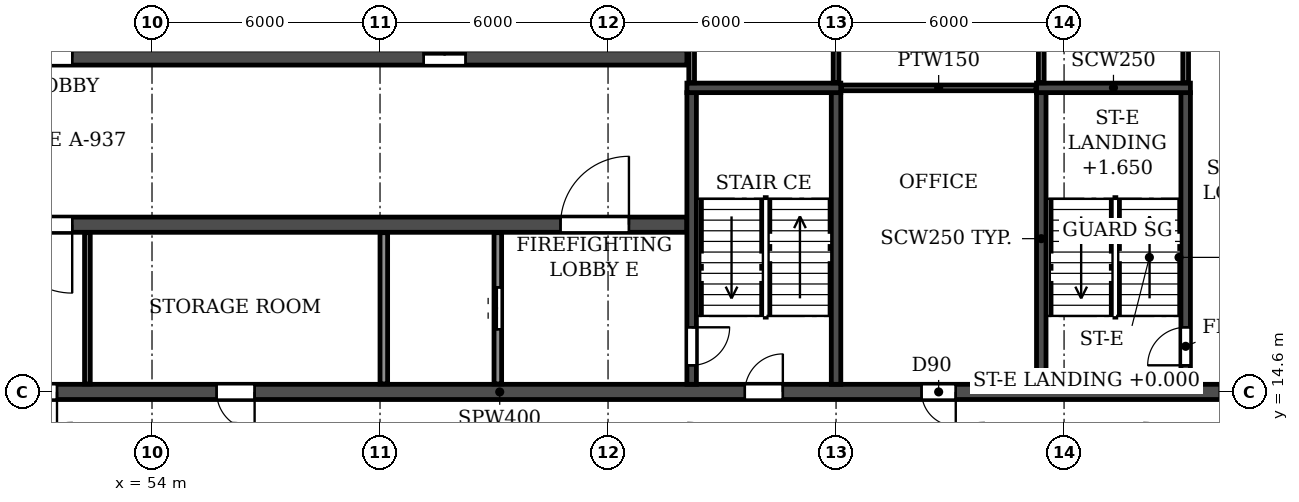
"""IFC4 building model, lengths in metres.
Left out: names, types, materials, properties, quantities, classifications, styles, units other than length and angle.
Written with IfcOpenShell. Run it as: python <this file> out.ifc"""

import sys

from ifc_helpers import new_model, si_unit, direction, frame, frame_2d, origin, place, context, subcontext, project, spatial, rectangle, extrude, element, fill, save


model = new_model("IFC4")
c1 = context("Model", 3, precision=1e-05, world=origin(), true_north=direction((0.0, 1.0)))
c2 = subcontext(c1, "Body", "Model", "MODEL_VIEW")
j1 = project(units=[si_unit("LENGTHUNIT", "METRE"), si_unit("PLANEANGLEUNIT", "RADIAN")], contexts=[c1])
p1 = place(None, origin())
s1 = spatial("IfcSite", under=j1, at=p1, CompositionType="ELEMENT")
p2 = place(p1, origin())
s2 = spatial("IfcBuilding", under=s1, at=p2, CompositionType="ELEMENT")
p3 = place(p2, frame((0.0, 0.0, 211.5)))
s3 = spatial("IfcBuildingStorey", under=s2, at=p3, CompositionType="ELEMENT", Elevation=211.5)
p4 = place(p3, frame((18.2, 14.6, 0.0), z_axis=(0.0, 0.0, 1.0), x_axis=(1.0, 0.0, 0.0)))
e1 = element("IfcWall", 1, at=p4, inside=s3, PredefinedType="SOLIDWALL", context=c2, shape_type="SweptSolid", body=[
    extrude(rectangle(XDim=65.6, YDim=0.4, at=frame_2d((32.8, 0.0))), origin(), (0.0, 0.0, 1.0), 2.95),
])
p5 = place(p4, frame((0.7, 0.0, 0.0)))
e2 = element("IfcOpeningElement", 2, at=p5, cuts=e1, PredefinedType="OPENING", context=c2, shape_type="SweptSolid", body=[
    extrude(rectangle(XDim=1.0, YDim=2.1, at=frame_2d((0.5, 1.05))), frame((0.0, 0.21, 0.0), z_axis=(0.0, -1.0, 0.0), x_axis=(1.0, 0.0, 0.0)), (0.0, 0.0, 1.0), 0.42),
])
p6 = place(p4, frame((8.65, 0.0, 0.0)))
e3 = element("IfcOpeningElement", 3, at=p6, cuts=e1, PredefinedType="OPENING", context=c2, shape_type="SweptSolid", body=[
    extrude(rectangle(XDim=0.9, YDim=2.1, at=frame_2d((0.45, 1.05))), frame((0.0, 0.21, 0.0), z_axis=(0.0, -1.0, 0.0), x_axis=(1.0, 0.0, 0.0)), (0.0, 0.0, 1.0), 0.42),
])
p7 = place(p4, frame((13.2, 0.0, 0.0)))
e4 = element("IfcOpeningElement", 4, at=p7, cuts=e1, PredefinedType="OPENING", context=c2, shape_type="SweptSolid", body=[
    extrude(rectangle(XDim=1.0, YDim=2.1, at=frame_2d((0.5, 1.05))), frame((0.0, 0.21, 0.0), z_axis=(0.0, -1.0, 0.0), x_axis=(1.0, 0.0, 0.0)), (0.0, 0.0, 1.0), 0.42),
])
p8 = place(p4, frame((24.5, 0.0, 0.0)))
e5 = element("IfcOpeningElement", 5, at=p8, cuts=e1, PredefinedType="OPENING", context=c2, shape_type="SweptSolid", body=[
    extrude(rectangle(XDim=1.0, YDim=2.1, at=frame_2d((0.5, 1.05))), frame((0.0, 0.21, 0.0), z_axis=(0.0, -1.0, 0.0), x_axis=(1.0, 0.0, 0.0)), (0.0, 0.0, 1.0), 0.42),
])
p9 = place(p4, frame((28.15, 0.0, 0.0)))
e6 = element("IfcOpeningElement", 6, at=p9, cuts=e1, PredefinedType="OPENING", context=c2, shape_type="SweptSolid", body=[
    extrude(rectangle(XDim=1.5, YDim=2.1, at=frame_2d((0.75, 1.05))), frame((0.0, 0.21, 0.0), z_axis=(0.0, -1.0, 0.0), x_axis=(1.0, 0.0, 0.0)), (0.0, 0.0, 1.0), 0.42),
])
p10 = place(p4, frame((32.3, 0.0, 0.0)))
e7 = element("IfcOpeningElement", 7, at=p10, cuts=e1, PredefinedType="OPENING", context=c2, shape_type="SweptSolid", body=[
    extrude(rectangle(XDim=1.0, YDim=2.1, at=frame_2d((0.5, 1.05))), frame((0.0, 0.21, 0.0), z_axis=(0.0, -1.0, 0.0), x_axis=(1.0, 0.0, 0.0)), (0.0, 0.0, 1.0), 0.42),
])
p11 = place(p4, frame((37.5, 0.0, 0.0)))
e8 = element("IfcOpeningElement", 8, at=p11, cuts=e1, PredefinedType="OPENING", context=c2, shape_type="SweptSolid", body=[
    extrude(rectangle(XDim=1.0, YDim=2.1, at=frame_2d((0.5, 1.05))), frame((0.0, 0.21, 0.0), z_axis=(0.0, -1.0, 0.0), x_axis=(1.0, 0.0, 0.0)), (0.0, 0.0, 1.0), 0.42),
])
p12 = place(p4, frame((51.4, 0.0, 0.0)))
e9 = element("IfcOpeningElement", 9, at=p12, cuts=e1, PredefinedType="OPENING", context=c2, shape_type="SweptSolid", body=[
    extrude(rectangle(XDim=1.0, YDim=2.1, at=frame_2d((0.5, 1.05))), frame((0.0, 0.21, 0.0), z_axis=(0.0, -1.0, 0.0), x_axis=(1.0, 0.0, 0.0)), (0.0, 0.0, 1.0), 0.42),
])
p13 = place(p4, frame((56.05, 0.0, 0.0)))
e10 = element("IfcOpeningElement", 10, at=p13, cuts=e1, PredefinedType="OPENING", context=c2, shape_type="SweptSolid", body=[
    extrude(rectangle(XDim=0.9, YDim=2.1, at=frame_2d((0.45, 1.05))), frame((0.0, 0.21, 0.0), z_axis=(0.0, -1.0, 0.0), x_axis=(1.0, 0.0, 0.0)), (0.0, 0.0, 1.0), 0.42),
])
p14 = place(p4, frame((63.9, 0.0, 0.0)))
e11 = element("IfcOpeningElement", 11, at=p14, cuts=e1, PredefinedType="OPENING", context=c2, shape_type="SweptSolid", body=[
    extrude(rectangle(XDim=1.0, YDim=2.1, at=frame_2d((0.5, 1.05))), frame((0.0, 0.21, 0.0), z_axis=(0.0, -1.0, 0.0), x_axis=(1.0, 0.0, 0.0)), (0.0, 0.0, 1.0), 0.42),
])
p15 = place(p3, frame((33.925, 19.0, 0.0), z_axis=(0.0, 0.0, 1.0), x_axis=(1.0, 0.0, 0.0)))
e12 = element("IfcWall", 12, at=p15, inside=s3, PredefinedType="SOLIDWALL", context=c2, shape_type="SweptSolid", body=[
    extrude(rectangle(XDim=34.15, YDim=0.4, at=frame_2d((17.075, 0.0))), origin(), (0.0, 0.0, 1.0), 2.95),
])
p16 = place(p15, frame((16.175, 0.0, 0.0)))
e13 = element("IfcOpeningElement", 13, at=p16, cuts=e12, PredefinedType="OPENING", context=c2, shape_type="SweptSolid", body=[
    extrude(rectangle(XDim=1.8, YDim=2.1, at=frame_2d((0.9, 1.05))), frame((0.0, 0.21, 0.0), z_axis=(0.0, -1.0, 0.0), x_axis=(1.0, 0.0, 0.0)), (0.0, 0.0, 1.0), 0.42),
])
p17 = place(p15, frame((1.525, 0.0, 0.0)))
e14 = element("IfcOpeningElement", 14, at=p17, cuts=e12, PredefinedType="OPENING", context=c2, shape_type="SweptSolid", body=[
    extrude(rectangle(XDim=1.8, YDim=2.1, at=frame_2d((0.9, 1.05))), frame((0.0, 0.21, 0.0), z_axis=(0.0, -1.0, 0.0), x_axis=(1.0, 0.0, 0.0)), (0.0, 0.0, 1.0), 0.42),
])
p18 = place(p15, frame((30.825, 0.0, 0.0)))
e15 = element("IfcOpeningElement", 15, at=p18, cuts=e12, PredefinedType="OPENING", context=c2, shape_type="SweptSolid", body=[
    extrude(rectangle(XDim=1.8, YDim=2.1, at=frame_2d((0.9, 1.05))), frame((0.0, 0.21, 0.0), z_axis=(0.0, -1.0, 0.0), x_axis=(1.0, 0.0, 0.0)), (0.0, 0.0, 1.0), 0.42),
])
p19 = place(p3, frame((33.925, 23.4, 0.0), z_axis=(0.0, 0.0, 1.0), x_axis=(1.0, 0.0, 0.0)))
e16 = element("IfcWall", 16, at=p19, inside=s3, PredefinedType="SOLIDWALL", context=c2, shape_type="SweptSolid", body=[
    extrude(rectangle(XDim=34.15, YDim=0.4, at=frame_2d((17.075, 0.0))), origin(), (0.0, 0.0, 1.0), 2.95),
])
p20 = place(p19, frame((16.175, 0.0, 0.0)))
e17 = element("IfcOpeningElement", 17, at=p20, cuts=e16, PredefinedType="OPENING", context=c2, shape_type="SweptSolid", body=[
    extrude(rectangle(XDim=1.8, YDim=2.1, at=frame_2d((0.9, 1.05))), frame((0.0, 0.21, 0.0), z_axis=(0.0, -1.0, 0.0), x_axis=(1.0, 0.0, 0.0)), (0.0, 0.0, 1.0), 0.42),
])
p21 = place(p19, frame((0.625, 0.0, 0.0)))
e18 = element("IfcOpeningElement", 18, at=p21, cuts=e16, PredefinedType="OPENING", context=c2, shape_type="SweptSolid", body=[
    extrude(rectangle(XDim=1.1, YDim=2.1, at=frame_2d((0.55, 1.05))), frame((0.0, 0.21, 0.0), z_axis=(0.0, -1.0, 0.0), x_axis=(1.0, 0.0, 0.0)), (0.0, 0.0, 1.0), 0.42),
])
p22 = place(p19, frame((3.225, 0.0, 0.0)))
e19 = element("IfcOpeningElement", 19, at=p22, cuts=e16, PredefinedType="OPENING", context=c2, shape_type="SweptSolid", body=[
    extrude(rectangle(XDim=1.1, YDim=2.1, at=frame_2d((0.55, 1.05))), frame((0.0, 0.21, 0.0), z_axis=(0.0, -1.0, 0.0), x_axis=(1.0, 0.0, 0.0)), (0.0, 0.0, 1.0), 0.42),
])
p23 = place(p19, frame((5.825, 0.0, 0.0)))
e20 = element("IfcOpeningElement", 20, at=p23, cuts=e16, PredefinedType="OPENING", context=c2, shape_type="SweptSolid", body=[
    extrude(rectangle(XDim=1.1, YDim=2.1, at=frame_2d((0.55, 1.05))), frame((0.0, 0.21, 0.0), z_axis=(0.0, -1.0, 0.0), x_axis=(1.0, 0.0, 0.0)), (0.0, 0.0, 1.0), 0.42),
])
p24 = place(p19, frame((8.425, 0.0, 0.0)))
e21 = element("IfcOpeningElement", 21, at=p24, cuts=e16, PredefinedType="OPENING", context=c2, shape_type="SweptSolid", body=[
    extrude(rectangle(XDim=1.1, YDim=2.1, at=frame_2d((0.55, 1.05))), frame((0.0, 0.21, 0.0), z_axis=(0.0, -1.0, 0.0), x_axis=(1.0, 0.0, 0.0)), (0.0, 0.0, 1.0), 0.42),
])
p25 = place(p19, frame((11.025, 0.0, 0.0)))
e22 = element("IfcOpeningElement", 22, at=p25, cuts=e16, PredefinedType="OPENING", context=c2, shape_type="SweptSolid", body=[
    extrude(rectangle(XDim=1.1, YDim=2.1, at=frame_2d((0.55, 1.05))), frame((0.0, 0.21, 0.0), z_axis=(0.0, -1.0, 0.0), x_axis=(1.0, 0.0, 0.0)), (0.0, 0.0, 1.0), 0.42),
])
p26 = place(p19, frame((13.625, 0.0, 0.0)))
e23 = element("IfcOpeningElement", 23, at=p26, cuts=e16, PredefinedType="OPENING", context=c2, shape_type="SweptSolid", body=[
    extrude(rectangle(XDim=1.1, YDim=2.1, at=frame_2d((0.55, 1.05))), frame((0.0, 0.21, 0.0), z_axis=(0.0, -1.0, 0.0), x_axis=(1.0, 0.0, 0.0)), (0.0, 0.0, 1.0), 0.42),
])
p27 = place(p19, frame((27.225, 0.0, 0.0)))
e24 = element("IfcOpeningElement", 24, at=p27, cuts=e16, PredefinedType="OPENING", context=c2, shape_type="SweptSolid", body=[
    extrude(rectangle(XDim=1.1, YDim=2.1, at=frame_2d((0.55, 1.05))), frame((0.0, 0.21, 0.0), z_axis=(0.0, -1.0, 0.0), x_axis=(1.0, 0.0, 0.0)), (0.0, 0.0, 1.0), 0.42),
])
p28 = place(p3, frame((68.2, 14.8, 0.0), z_axis=(0.0, 0.0, 1.0), x_axis=(0.0, 1.0, 0.0)))
e25 = element("IfcWall", 25, at=p28, inside=s3, PredefinedType="SOLIDWALL", context=c2, shape_type="SweptSolid", body=[
    extrude(rectangle(XDim=7.675, YDim=0.25, at=frame_2d((3.837, 0.0))), origin(), (0.0, 0.0, 1.0), 2.95),
])
p29 = place(p28, frame((0.5, 0.0, 0.0)))
e26 = element("IfcOpeningElement", 26, at=p29, cuts=e25, PredefinedType="OPENING", context=c2, shape_type="SweptSolid", body=[
    extrude(rectangle(XDim=1.0, YDim=2.1, at=frame_2d((0.5, 1.05))), frame((0.0, 0.135, 0.0), z_axis=(0.0, -1.0, 0.0), x_axis=(1.0, 0.0, 0.0)), (0.0, 0.0, 1.0), 0.27),
])
p30 = place(p3, frame((72.0, 14.8, 0.0), z_axis=(0.0, 0.0, 1.0), x_axis=(0.0, 1.0, 0.0)))
e27 = element("IfcWall", 27, at=p30, inside=s3, PredefinedType="SOLIDWALL", context=c2, shape_type="SweptSolid", body=[
    extrude(rectangle(XDim=7.675, YDim=0.25, at=frame_2d((3.837, 0.0))), origin(), (0.0, 0.0, 1.0), 2.95),
])
p31 = place(p3, frame((68.075, 22.6, 0.0), z_axis=(0.0, 0.0, 1.0), x_axis=(1.0, 0.0, 0.0)))
e28 = element("IfcWall", 28, at=p31, inside=s3, PredefinedType="SOLIDWALL", context=c2, shape_type="SweptSolid", body=[
    extrude(rectangle(XDim=4.05, YDim=0.25, at=frame_2d((2.025, 0.0))), origin(), (0.0, 0.0, 1.0), 2.95),
])
p32 = place(p3, frame((77.4, 14.8, 0.0), z_axis=(0.0, 0.0, 1.0), x_axis=(0.0, 1.0, 0.0)))
e29 = element("IfcWall", 29, at=p32, inside=s3, PredefinedType="SOLIDWALL", context=c2, shape_type="SweptSolid", body=[
    extrude(rectangle(XDim=7.675, YDim=0.25, at=frame_2d((3.837, 0.0))), origin(), (0.0, 0.0, 1.0), 2.95),
])
p33 = place(p3, frame((81.2, 14.8, 0.0), z_axis=(0.0, 0.0, 1.0), x_axis=(0.0, 1.0, 0.0)))
e30 = element("IfcWall", 30, at=p33, inside=s3, PredefinedType="SOLIDWALL", context=c2, shape_type="SweptSolid", body=[
    extrude(rectangle(XDim=7.675, YDim=0.25, at=frame_2d((3.837, 0.0))), origin(), (0.0, 0.0, 1.0), 2.95),
])
p34 = place(p33, frame((0.5, 0.0, 0.0)))
e31 = element("IfcOpeningElement", 31, at=p34, cuts=e30, PredefinedType="OPENING", context=c2, shape_type="SweptSolid", body=[
    extrude(rectangle(XDim=1.0, YDim=2.1, at=frame_2d((0.5, 1.05))), frame((0.0, 0.135, 0.0), z_axis=(0.0, -1.0, 0.0), x_axis=(1.0, 0.0, 0.0)), (0.0, 0.0, 1.0), 0.27),
])
p35 = place(p3, frame((77.275, 22.6, 0.0), z_axis=(0.0, 0.0, 1.0), x_axis=(1.0, 0.0, 0.0)))
e32 = element("IfcWall", 32, at=p35, inside=s3, PredefinedType="SOLIDWALL", context=c2, shape_type="SweptSolid", body=[
    extrude(rectangle(XDim=4.05, YDim=0.25, at=frame_2d((2.025, 0.0))), origin(), (0.0, 0.0, 1.0), 2.95),
])
p36 = place(p3, frame((52.3, 14.81, 0.0), z_axis=(0.0, 0.0, 1.0), x_axis=(0.0, 1.0, 0.0)))
e33 = element("IfcWall", 33, at=p36, inside=s3, PredefinedType="PARTITIONING", context=c2, shape_type="SweptSolid", body=[
    extrude(rectangle(XDim=3.98, YDim=0.15, at=frame_2d((1.99, 0.0))), origin(), (0.0, 0.0, 1.0), 2.95),
])
p37 = place(p3, frame((72.135, 22.6, 0.0), z_axis=(0.0, 0.0, 1.0), x_axis=(1.0, 0.0, 0.0)))
e34 = element("IfcWall", 34, at=p37, inside=s3, PredefinedType="PARTITIONING", context=c2, shape_type="SweptSolid", body=[
    extrude(rectangle(XDim=5.13, YDim=0.15, at=frame_2d((2.565, 0.0))), origin(), (0.0, 0.0, 1.0), 2.95),
])
for number, where, z_axis, x_axis in (
    (35, (68.2, 22.735, 0.0), (0.0, 0.0, 1.0), (0.0, 1.0, 0.0)),
    (36, (72.0, 22.735, 0.0), (0.0, 0.0, 1.0), (0.0, 1.0, 0.0)),
    (37, (77.4, 22.735, 0.0), (0.0, 0.0, 1.0), (0.0, 1.0, 0.0)),
    (38, (81.2, 22.735, 0.0), (0.0, 0.0, 1.0), (0.0, 1.0, 0.0)),
):
    element("IfcWall", number, at=place(p3, frame(where, z_axis=z_axis, x_axis=x_axis)), inside=s3, PredefinedType="PARTITIONING", context=c2, shape_type="SweptSolid", body=[
        extrude(rectangle(XDim=4.855, YDim=0.15, at=frame_2d((2.427, 0.0))), origin(), (0.0, 0.0, 1.0), 2.95),
    ])
p38 = place(p3, frame((60.1, 14.81, 0.0), z_axis=(0.0, 0.0, 1.0), x_axis=(0.0, 1.0, 0.0)))
e39 = element("IfcWall", 39, at=p38, inside=s3, PredefinedType="PARTITIONING", context=c2, shape_type="SweptSolid", body=[
    extrude(rectangle(XDim=3.98, YDim=0.2, at=frame_2d((1.99, 0.0))), origin(), (0.0, 0.0, 1.0), 2.95),
])
p39 = place(p3, frame((63.1, 14.81, 0.0), z_axis=(0.0, 0.0, 1.0), x_axis=(0.0, 1.0, 0.0)))
e40 = element("IfcWall", 40, at=p39, inside=s3, PredefinedType="PARTITIONING", context=c2, shape_type="SweptSolid", body=[
    extrude(rectangle(XDim=3.98, YDim=0.2, at=frame_2d((1.99, 0.0))), origin(), (0.0, 0.0, 1.0), 2.95),
])
p40 = place(p39, frame((1.44, 0.0, 0.0)))
e41 = element("IfcOpeningElement", 41, at=p40, cuts=e40, PredefinedType="OPENING", context=c2, shape_type="SweptSolid", body=[
    extrude(rectangle(XDim=1.1, YDim=2.1, at=frame_2d((0.55, 1.05))), frame((0.0, 0.11, 0.0), z_axis=(0.0, -1.0, 0.0), x_axis=(1.0, 0.0, 0.0)), (0.0, 0.0, 1.0), 0.22),
])
p41 = place(p10, frame((1.0, 0.0, 0.0), z_axis=(0.0, 0.0, 1.0), x_axis=(-1.0, 0.0, 0.0)))
e42 = element("IfcDoor", 42, at=p41, inside=s3, OperationType="SINGLE_SWING_LEFT", PredefinedType="DOOR", context=c2, shape_type="SweptSolid", body=[
    extrude(rectangle(XDim=1.0, YDim=2.1, at=frame_2d((0.5, 1.05))), frame((0.0, 0.025, 0.0), z_axis=(0.0, -1.0, 0.0), x_axis=(1.0, 0.0, 0.0)), (0.0, 0.0, 1.0), 0.05),
])
fill(e7, e42)
p42 = place(p11, frame((1.0, 0.0, 0.0), z_axis=(0.0, 0.0, 1.0), x_axis=(-1.0, 0.0, 0.0)))
e43 = element("IfcDoor", 43, at=p42, inside=s3, OperationType="SINGLE_SWING_LEFT", PredefinedType="DOOR", context=c2, shape_type="SweptSolid", body=[
    extrude(rectangle(XDim=1.0, YDim=2.1, at=frame_2d((0.5, 1.05))), frame((0.0, 0.025, 0.0), z_axis=(0.0, -1.0, 0.0), x_axis=(1.0, 0.0, 0.0)), (0.0, 0.0, 1.0), 0.05),
])
fill(e8, e43)
p43 = place(p12, origin())
e44 = element("IfcDoor", 44, at=p43, inside=s3, OperationType="SINGLE_SWING_RIGHT", PredefinedType="DOOR", context=c2, shape_type="SweptSolid", body=[
    extrude(rectangle(XDim=1.0, YDim=2.1, at=frame_2d((0.5, 1.05))), frame((0.0, 0.025, 0.0), z_axis=(0.0, -1.0, 0.0), x_axis=(1.0, 0.0, 0.0)), (0.0, 0.0, 1.0), 0.05),
])
fill(e9, e44)
p44 = place(p13, frame((0.9, 0.0, 0.0), z_axis=(0.0, 0.0, 1.0), x_axis=(-1.0, 0.0, 0.0)))
e45 = element("IfcDoor", 45, at=p44, inside=s3, OperationType="SINGLE_SWING_LEFT", PredefinedType="DOOR", context=c2, shape_type="SweptSolid", body=[
    extrude(rectangle(XDim=0.9, YDim=2.1, at=frame_2d((0.45, 1.05))), frame((0.0, 0.025, 0.0), z_axis=(0.0, -1.0, 0.0), x_axis=(1.0, 0.0, 0.0)), (0.0, 0.0, 1.0), 0.05),
])
fill(e10, e45)
p45 = place(p40, origin())
e46 = element("IfcDoor", 46, at=p45, inside=s3, OperationType="DOUBLE_DOOR_SLIDING", PredefinedType="DOOR", context=c2, shape_type="SweptSolid", body=[
    extrude(rectangle(XDim=1.1, YDim=2.1, at=frame_2d((0.55, 1.05))), frame((0.0, 0.025, 0.0), z_axis=(0.0, -1.0, 0.0), x_axis=(1.0, 0.0, 0.0)), (0.0, 0.0, 1.0), 0.05),
])
fill(e41, e46)
p46 = place(p29, frame((1.0, 0.0, 0.0), z_axis=(0.0, 0.0, 1.0), x_axis=(-1.0, 0.0, 0.0)))
e47 = element("IfcDoor", 47, at=p46, inside=s3, OperationType="SINGLE_SWING_LEFT", PredefinedType="DOOR", context=c2, shape_type="SweptSolid", body=[
    extrude(rectangle(XDim=1.0, YDim=2.1, at=frame_2d((0.5, 1.05))), frame((0.0, 0.025, 0.0), z_axis=(0.0, -1.0, 0.0), x_axis=(1.0, 0.0, 0.0)), (0.0, 0.0, 1.0), 0.05),
])
fill(e26, e47)
p47 = place(p20, origin())
e48 = element("IfcDoor", 48, at=p47, inside=s3, OperationType="DOUBLE_DOOR_SINGLE_SWING", PredefinedType="DOOR", context=c2, shape_type="SweptSolid", body=[
    extrude(rectangle(XDim=1.8, YDim=2.1, at=frame_2d((0.9, 1.05))), frame((0.0, 0.025, 0.0), z_axis=(0.0, -1.0, 0.0), x_axis=(1.0, 0.0, 0.0)), (0.0, 0.0, 1.0), 0.05),
])
fill(e17, e48)
p48 = place(p16, frame((1.8, 0.0, 0.0), z_axis=(0.0, 0.0, 1.0), x_axis=(-1.0, 0.0, 0.0)))
e49 = element("IfcDoor", 49, at=p48, inside=s3, OperationType="DOUBLE_DOOR_SINGLE_SWING", PredefinedType="DOOR", context=c2, shape_type="SweptSolid", body=[
    extrude(rectangle(XDim=1.8, YDim=2.1, at=frame_2d((0.9, 1.05))), frame((0.0, 0.025, 0.0), z_axis=(0.0, -1.0, 0.0), x_axis=(1.0, 0.0, 0.0)), (0.0, 0.0, 1.0), 0.05),
])
fill(e13, e49)
p49 = place(p27, origin())
e50 = element("IfcDoor", 50, at=p49, inside=s3, OperationType="DOUBLE_DOOR_SLIDING", PredefinedType="DOOR", context=c2, shape_type="SweptSolid", body=[
    extrude(rectangle(XDim=1.1, YDim=2.1, at=frame_2d((0.55, 1.05))), frame((0.0, 0.025, 0.0), z_axis=(0.0, -1.0, 0.0), x_axis=(1.0, 0.0, 0.0)), (0.0, 0.0, 1.0), 0.05),
])
fill(e24, e50)
p50 = place(p18, origin())
e51 = element("IfcDoor", 51, at=p50, inside=s3, OperationType="DOUBLE_DOOR_SINGLE_SWING", PredefinedType="DOOR", context=c2, shape_type="SweptSolid", body=[
    extrude(rectangle(XDim=1.8, YDim=2.1, at=frame_2d((0.9, 1.05))), frame((0.0, 0.025, 0.0), z_axis=(0.0, -1.0, 0.0), x_axis=(1.0, 0.0, 0.0)), (0.0, 0.0, 1.0), 0.05),
])
fill(e15, e51)
p51 = place(p34, origin())
e52 = element("IfcDoor", 52, at=p51, inside=s3, OperationType="SINGLE_SWING_LEFT", PredefinedType="DOOR", context=c2, shape_type="SweptSolid", body=[
    extrude(rectangle(XDim=1.0, YDim=2.1, at=frame_2d((0.5, 1.05))), frame((0.0, 0.025, 0.0), z_axis=(0.0, -1.0, 0.0), x_axis=(1.0, 0.0, 0.0)), (0.0, 0.0, 1.0), 0.05),
])
fill(e31, e52)
save(model, sys.argv[1])
